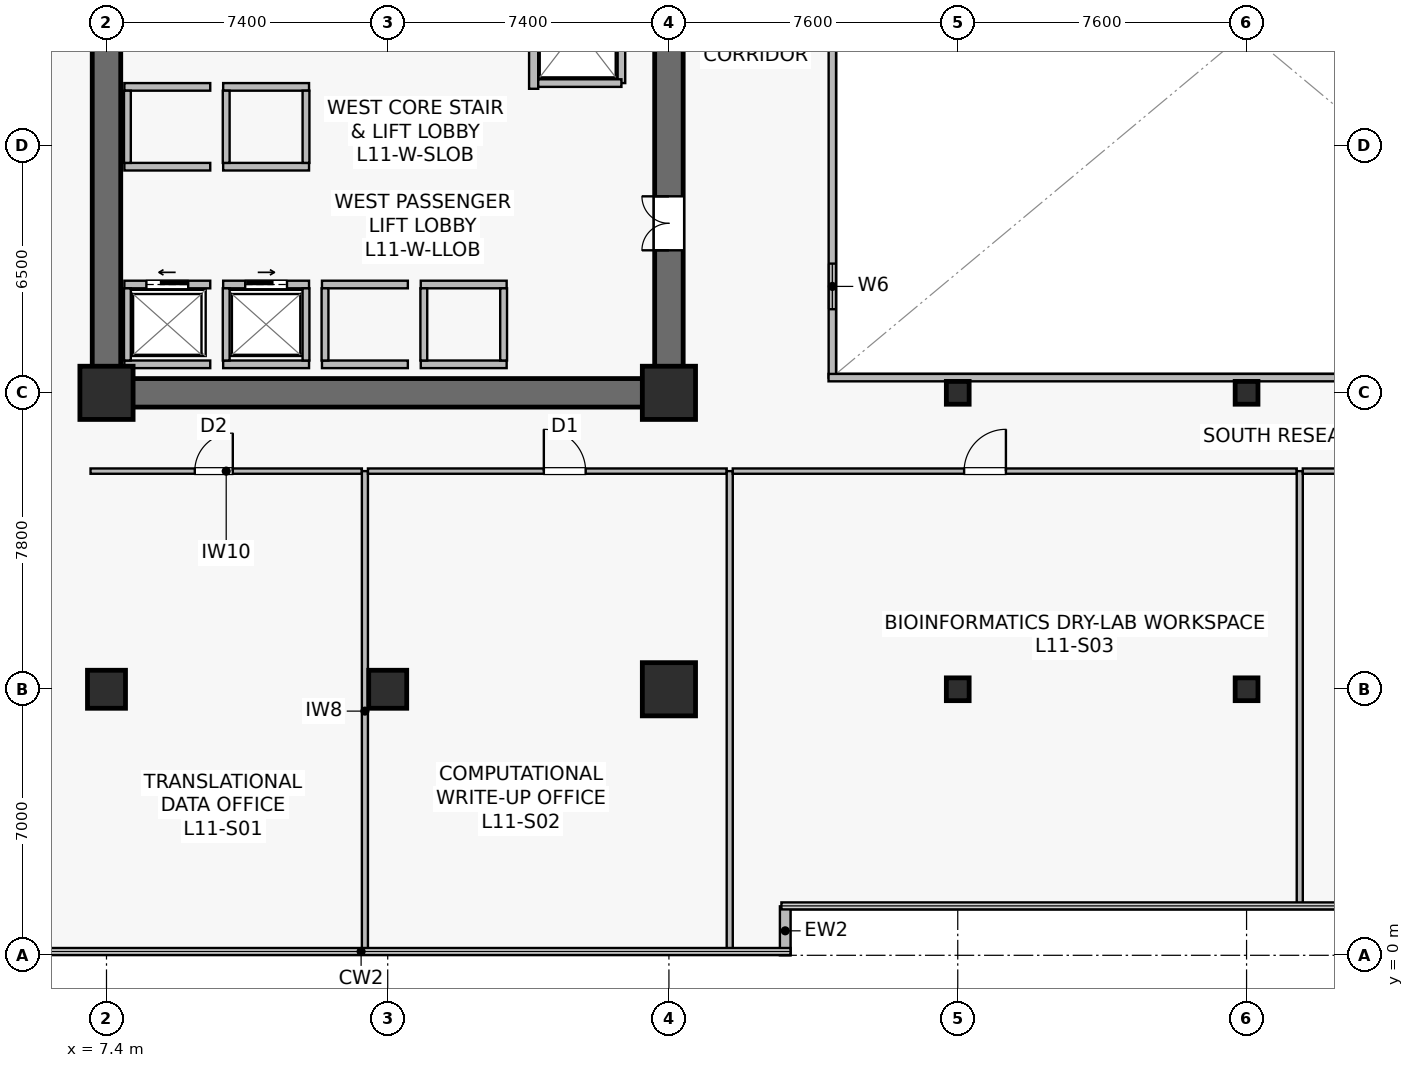
"""IFC4 building model, lengths in metres.
Left out: names, types, materials, properties, quantities, classifications, styles, units other than length and angle.
Written with IfcOpenShell. Run it as: python <this file> out.ifc"""

import sys

from ifc_helpers import new_model, si_unit, direction, frame, frame_2d, origin, origin_2d, place, context, subcontext, project, spatial, rectangle, hollow_rectangle, extrude, source, transform, mapped, element, fill, save


model = new_model("IFC4")
c1 = context("Model", 3, precision=1e-05, world=origin(), true_north=direction((0.0, 1.0)))
c2 = subcontext(c1, "Body", "Model", "MODEL_VIEW")
j1 = project(units=[si_unit("LENGTHUNIT", "METRE"), si_unit("PLANEANGLEUNIT", "RADIAN")], contexts=[c1])
p1 = place(None, origin())
s1 = spatial("IfcSite", under=j1, at=p1, CompositionType="ELEMENT")
p2 = place(p1, origin())
s2 = spatial("IfcBuilding", under=s1, at=p2, CompositionType="ELEMENT")
p3 = place(p2, frame((0.0, 0.0, 45.7)))
s3 = spatial("IfcBuildingStorey", under=s2, at=p3, CompositionType="ELEMENT", Elevation=45.7)
p4 = place(p3, frame((7.025, 14.8, 0.0), z_axis=(0.0, 0.0, 1.0), x_axis=(1.0, 0.0, 0.0)))
e1 = element("IfcWall", 1, at=p4, inside=s3, PredefinedType="SHEAR", context=c2, shape_type="SweptSolid", body=[
    extrude(rectangle(XDim=15.55, YDim=0.75, at=frame_2d((7.775, 0.0))), origin(), (0.0, 0.0, 1.0), 3.78),
])
p5 = place(p3, frame((7.4, 15.175, 0.0), z_axis=(0.0, 0.0, 1.0), x_axis=(0.0, 1.0, 0.0)))
e2 = element("IfcWall", 2, at=p5, inside=s3, PredefinedType="SHEAR", context=c2, shape_type="SweptSolid", body=[
    extrude(rectangle(XDim=18.25, YDim=0.75, at=frame_2d((9.125, 0.0))), origin(), (0.0, 0.0, 1.0), 3.78),
])
p6 = place(p3, frame((22.2, 15.175, 0.0), z_axis=(0.0, 0.0, 1.0), x_axis=(0.0, 1.0, 0.0)))
e3 = element("IfcWall", 3, at=p6, inside=s3, PredefinedType="SHEAR", context=c2, shape_type="SweptSolid", body=[
    extrude(rectangle(XDim=18.25, YDim=0.75, at=frame_2d((9.125, 0.0))), origin(), (0.0, 0.0, 1.0), 3.78),
])
p7 = place(p6, frame((3.375, 0.0, 0.0)))
e4 = element("IfcOpeningElement", 4, at=p7, cuts=e3, PredefinedType="OPENING", context=c2, shape_type="SweptSolid", body=[
    extrude(rectangle(XDim=1.42, YDim=2.2, at=frame_2d((0.71, 1.1))), frame((0.0, 0.385, 0.0), z_axis=(0.0, -1.0, 0.0), x_axis=(1.0, 0.0, 0.0)), (0.0, 0.0, 1.0), 0.77),
])
m1 = source(origin(), c2, "Body", "SweptSolid", [
    extrude(rectangle(XDim=1.0, YDim=1.0, at=origin_2d()), origin(), (0.0, 0.0, 1.0), 4.1),
])
p8 = place(p3, frame((14.8, 7.0, 0.0), z_axis=(0.0, 0.0, 1.0), x_axis=(1.0, 0.0, 0.0)))
e5 = element("IfcColumn", 5, at=p8, inside=s3, PredefinedType="COLUMN", context=c2, shape_type="MappedRepresentation", body=[
    mapped(m1, transform((0.0, 0.0, 0.0), scale=1.0)),
])
m2 = source(origin(), c2, "Body", "SweptSolid", [
    extrude(rectangle(XDim=1.4, YDim=1.4, at=origin_2d()), origin(), (0.0, 0.0, 1.0), 4.1),
])
for number, where, z_axis, x_axis in (
    (6, (22.2, 7.0, 0.0), (0.0, 0.0, 1.0), (1.0, 0.0, 0.0)),
    (7, (7.4, 14.8, 0.0), (0.0, 0.0, 1.0), (1.0, 0.0, 0.0)),
    (8, (22.2, 14.8, 0.0), (0.0, 0.0, 1.0), (1.0, 0.0, 0.0)),
):
    element("IfcColumn", number, at=place(p3, frame(where, z_axis=z_axis, x_axis=x_axis)), inside=s3, PredefinedType="COLUMN", context=c2, shape_type="MappedRepresentation", body=[
        mapped(m2, transform((0.0, 0.0, 0.0), scale=1.0)),
    ])
p9 = place(p3, frame((7.4, 7.0, 0.0), z_axis=(0.0, 0.0, 1.0), x_axis=(1.0, 0.0, 0.0)))
e9 = element("IfcColumn", 9, at=p9, inside=s3, PredefinedType="COLUMN", context=c2, shape_type="MappedRepresentation", body=[
    mapped(m1, transform((0.0, 0.0, 0.0), scale=1.0)),
])
m3 = source(origin(), c2, "Body", "SweptSolid", [
    extrude(hollow_rectangle(XDim=0.6, YDim=0.6, WallThickness=0.028, at=origin_2d()), origin(), (0.0, 0.0, 1.0), 4.1),
])
for number, where, z_axis, x_axis in (
    (10, (29.8, 7.0, 0.0), (0.0, 0.0, 1.0), (1.0, 0.0, 0.0)),
    (11, (29.8, 14.8, 0.0), (0.0, 0.0, 1.0), (1.0, 0.0, 0.0)),
    (12, (37.4, 7.0, 0.0), (0.0, 0.0, 1.0), (1.0, 0.0, 0.0)),
    (13, (37.4, 14.8, 0.0), (0.0, 0.0, 1.0), (1.0, 0.0, 0.0)),
):
    element("IfcColumn", number, at=place(p3, frame(where, z_axis=z_axis, x_axis=x_axis)), inside=s3, PredefinedType="COLUMN", context=c2, shape_type="MappedRepresentation", body=[
        mapped(m3, transform((0.0, 0.0, 0.0), scale=1.0)),
    ])
p10 = place(p3, frame((25.26, 0.0, 0.0), z_axis=(0.0, 0.0, 1.0), x_axis=(0.0, 1.0, 0.0)))
e14 = element("IfcWall", 14, at=p10, inside=s3, PredefinedType="STANDARD", context=c2, shape_type="SweptSolid", body=[
    extrude(rectangle(XDim=1.288, YDim=0.28, at=frame_2d((0.644, 0.0))), origin(), (0.0, 0.0, 1.0), 3.78),
])
p11 = place(p3, frame((18.64, 22.8, 0.0), z_axis=(0.0, 0.0, 1.0), x_axis=(0.0, 1.0, 0.0)))
e15 = element("IfcWall", 15, at=p11, inside=s3, PredefinedType="SOLIDWALL", context=c2, shape_type="SweptSolid", body=[
    extrude(rectangle(XDim=6.85, YDim=0.24, at=frame_2d((3.425, 0.0))), origin(), (0.0, 0.0, 1.0), 2.865),
])
p12 = place(p11, frame((4.85, 0.0, 0.0)))
e16 = element("IfcOpeningElement", 16, at=p12, cuts=e15, PredefinedType="OPENING", context=c2, shape_type="SweptSolid", body=[
    extrude(rectangle(XDim=1.1, YDim=2.22, at=frame_2d((0.55, 1.11))), frame((0.0, 0.13, 0.0), z_axis=(0.0, -1.0, 0.0), x_axis=(1.0, 0.0, 0.0)), (0.0, 0.0, 1.0), 0.26),
])
p13 = place(p11, frame((1.0, 0.0, 0.0)))
e17 = element("IfcOpeningElement", 17, at=p13, cuts=e15, PredefinedType="OPENING", context=c2, shape_type="SweptSolid", body=[
    extrude(rectangle(XDim=1.2, YDim=2.22, at=frame_2d((0.6, 1.11))), frame((0.0, 0.13, 0.0), z_axis=(0.0, -1.0, 0.0), x_axis=(1.0, 0.0, 0.0)), (0.0, 0.0, 1.0), 0.26),
])
p14 = place(p3, frame((7.87, 17.65, 0.0), z_axis=(0.0, 0.0, 1.0), x_axis=(1.0, 0.0, 0.0)))
e18 = element("IfcWall", 18, at=p14, inside=s3, PredefinedType="SOLIDWALL", context=c2, shape_type="SweptSolid", body=[
    extrude(rectangle(XDim=2.26, YDim=0.2, at=frame_2d((1.13, 0.0))), origin(), (0.0, 0.0, 1.0), 3.78),
])
p15 = place(p14, frame((0.58, 0.0, 0.0)))
e19 = element("IfcOpeningElement", 19, at=p15, cuts=e18, PredefinedType="OPENING", context=c2, shape_type="SweptSolid", body=[
    extrude(rectangle(XDim=1.1, YDim=2.22, at=frame_2d((0.55, 1.11))), frame((0.0, 0.11, 0.0), z_axis=(0.0, -1.0, 0.0), x_axis=(1.0, 0.0, 0.0)), (0.0, 0.0, 1.0), 0.22),
])
p16 = place(p3, frame((7.87, 15.55, 0.0), z_axis=(0.0, 0.0, 1.0), x_axis=(1.0, 0.0, 0.0)))
e20 = element("IfcWall", 20, at=p16, inside=s3, PredefinedType="SOLIDWALL", context=c2, shape_type="SweptSolid", body=[
    extrude(rectangle(XDim=2.26, YDim=0.2, at=frame_2d((1.13, 0.0))), origin(), (0.0, 0.0, 1.0), 3.78),
])
p17 = place(p3, frame((7.95, 15.65, 0.0), z_axis=(0.0, 0.0, 1.0), x_axis=(0.0, 1.0, 0.0)))
e21 = element("IfcWall", 21, at=p17, inside=s3, PredefinedType="SOLIDWALL", context=c2, shape_type="SweptSolid", body=[
    extrude(rectangle(XDim=1.9, YDim=0.18, at=frame_2d((0.95, 0.0))), origin(), (0.0, 0.0, 1.0), 3.78),
])
p18 = place(p3, frame((10.47, 17.65, 0.0), z_axis=(0.0, 0.0, 1.0), x_axis=(1.0, 0.0, 0.0)))
e22 = element("IfcWall", 22, at=p18, inside=s3, PredefinedType="SOLIDWALL", context=c2, shape_type="SweptSolid", body=[
    extrude(rectangle(XDim=2.26, YDim=0.2, at=frame_2d((1.13, 0.0))), origin(), (0.0, 0.0, 1.0), 3.78),
])
p19 = place(p18, frame((0.58, 0.0, 0.0)))
e23 = element("IfcOpeningElement", 23, at=p19, cuts=e22, PredefinedType="OPENING", context=c2, shape_type="SweptSolid", body=[
    extrude(rectangle(XDim=1.1, YDim=2.22, at=frame_2d((0.55, 1.11))), frame((0.0, 0.11, 0.0), z_axis=(0.0, -1.0, 0.0), x_axis=(1.0, 0.0, 0.0)), (0.0, 0.0, 1.0), 0.22),
])
p20 = place(p3, frame((10.47, 15.55, 0.0), z_axis=(0.0, 0.0, 1.0), x_axis=(1.0, 0.0, 0.0)))
e24 = element("IfcWall", 24, at=p20, inside=s3, PredefinedType="SOLIDWALL", context=c2, shape_type="SweptSolid", body=[
    extrude(rectangle(XDim=2.26, YDim=0.2, at=frame_2d((1.13, 0.0))), origin(), (0.0, 0.0, 1.0), 3.78),
])
for number, where, z_axis, x_axis in (
    (25, (10.55, 15.65, 0.0), (0.0, 0.0, 1.0), (0.0, 1.0, 0.0)),
    (26, (12.65, 15.65, 0.0), (0.0, 0.0, 1.0), (0.0, 1.0, 0.0)),
):
    element("IfcWall", number, at=place(p3, frame(where, z_axis=z_axis, x_axis=x_axis)), inside=s3, PredefinedType="SOLIDWALL", context=c2, shape_type="SweptSolid", body=[
        extrude(rectangle(XDim=1.9, YDim=0.18, at=frame_2d((0.95, 0.0))), origin(), (0.0, 0.0, 1.0), 3.78),
    ])
for number, where, z_axis, x_axis in (
    (27, (13.07, 17.65, 0.0), (0.0, 0.0, 1.0), (1.0, 0.0, 0.0)),
    (28, (13.07, 15.55, 0.0), (0.0, 0.0, 1.0), (1.0, 0.0, 0.0)),
):
    element("IfcWall", number, at=place(p3, frame(where, z_axis=z_axis, x_axis=x_axis)), inside=s3, PredefinedType="SOLIDWALL", context=c2, shape_type="SweptSolid", body=[
        extrude(rectangle(XDim=2.26, YDim=0.2, at=frame_2d((1.13, 0.0))), origin(), (0.0, 0.0, 1.0), 3.065),
    ])
p21 = place(p3, frame((13.15, 15.65, 0.0), z_axis=(0.0, 0.0, 1.0), x_axis=(0.0, 1.0, 0.0)))
e29 = element("IfcWall", 29, at=p21, inside=s3, PredefinedType="SOLIDWALL", context=c2, shape_type="SweptSolid", body=[
    extrude(rectangle(XDim=1.9, YDim=0.18, at=frame_2d((0.95, 0.0))), origin(), (0.0, 0.0, 1.0), 3.78),
])
for number, where, z_axis, x_axis in (
    (30, (15.67, 17.65, 0.0), (0.0, 0.0, 1.0), (1.0, 0.0, 0.0)),
    (31, (15.67, 15.55, 0.0), (0.0, 0.0, 1.0), (1.0, 0.0, 0.0)),
):
    element("IfcWall", number, at=place(p3, frame(where, z_axis=z_axis, x_axis=x_axis)), inside=s3, PredefinedType="SOLIDWALL", context=c2, shape_type="SweptSolid", body=[
        extrude(rectangle(XDim=2.26, YDim=0.2, at=frame_2d((1.13, 0.0))), origin(), (0.0, 0.0, 1.0), 3.78),
    ])
for number, where, z_axis, x_axis in (
    (32, (15.75, 15.65, 0.0), (0.0, 0.0, 1.0), (0.0, 1.0, 0.0)),
    (33, (17.85, 15.65, 0.0), (0.0, 0.0, 1.0), (0.0, 1.0, 0.0)),
):
    element("IfcWall", number, at=place(p3, frame(where, z_axis=z_axis, x_axis=x_axis)), inside=s3, PredefinedType="SOLIDWALL", context=c2, shape_type="SweptSolid", body=[
        extrude(rectangle(XDim=1.9, YDim=0.18, at=frame_2d((0.95, 0.0))), origin(), (0.0, 0.0, 1.0), 3.78),
    ])
for number, where, z_axis, x_axis in (
    (34, (7.87, 20.75, 0.0), (0.0, 0.0, 1.0), (1.0, 0.0, 0.0)),
    (35, (7.87, 22.85, 0.0), (0.0, 0.0, 1.0), (1.0, 0.0, 0.0)),
):
    element("IfcWall", number, at=place(p3, frame(where, z_axis=z_axis, x_axis=x_axis)), inside=s3, PredefinedType="SOLIDWALL", context=c2, shape_type="SweptSolid", body=[
        extrude(rectangle(XDim=2.26, YDim=0.2, at=frame_2d((1.13, 0.0))), origin(), (0.0, 0.0, 1.0), 3.78),
    ])
p22 = place(p3, frame((7.95, 20.85, 0.0), z_axis=(0.0, 0.0, 1.0), x_axis=(0.0, 1.0, 0.0)))
e36 = element("IfcWall", 36, at=p22, inside=s3, PredefinedType="SOLIDWALL", context=c2, shape_type="SweptSolid", body=[
    extrude(rectangle(XDim=1.9, YDim=0.18, at=frame_2d((0.95, 0.0))), origin(), (0.0, 0.0, 1.0), 3.78),
])
for number, where, z_axis, x_axis in (
    (37, (10.47, 20.75, 0.0), (0.0, 0.0, 1.0), (1.0, 0.0, 0.0)),
    (38, (10.47, 22.85, 0.0), (0.0, 0.0, 1.0), (1.0, 0.0, 0.0)),
):
    element("IfcWall", number, at=place(p3, frame(where, z_axis=z_axis, x_axis=x_axis)), inside=s3, PredefinedType="SOLIDWALL", context=c2, shape_type="SweptSolid", body=[
        extrude(rectangle(XDim=2.26, YDim=0.2, at=frame_2d((1.13, 0.0))), origin(), (0.0, 0.0, 1.0), 3.78),
    ])
for number, where, z_axis, x_axis in (
    (39, (10.55, 20.85, 0.0), (0.0, 0.0, 1.0), (0.0, 1.0, 0.0)),
    (40, (12.65, 20.85, 0.0), (0.0, 0.0, 1.0), (0.0, 1.0, 0.0)),
):
    element("IfcWall", number, at=place(p3, frame(where, z_axis=z_axis, x_axis=x_axis)), inside=s3, PredefinedType="SOLIDWALL", context=c2, shape_type="SweptSolid", body=[
        extrude(rectangle(XDim=1.9, YDim=0.18, at=frame_2d((0.95, 0.0))), origin(), (0.0, 0.0, 1.0), 3.78),
    ])
p23 = place(p3, frame((20.95, 22.95, 0.0), z_axis=(0.0, 0.0, 1.0), x_axis=(0.0, 1.0, 0.0)))
e41 = element("IfcWall", 41, at=p23, inside=s3, PredefinedType="SOLIDWALL", context=c2, shape_type="SweptSolid", body=[
    extrude(rectangle(XDim=2.9, YDim=0.2, at=frame_2d((1.45, 0.0))), origin(), (0.0, 0.0, 1.0), 2.865),
])
p24 = place(p3, frame((18.76, 22.95, 0.0), z_axis=(0.0, 0.0, 1.0), x_axis=(1.0, 0.0, 0.0)))
e42 = element("IfcWall", 42, at=p24, inside=s3, PredefinedType="SOLIDWALL", context=c2, shape_type="SweptSolid", body=[
    extrude(rectangle(XDim=2.19, YDim=0.2, at=frame_2d((1.095, 0.0))), origin(), (0.0, 0.0, 1.0), 3.78),
])
p25 = place(p3, frame((26.5, 15.2, 0.0), z_axis=(0.0, 0.0, 1.0), x_axis=(0.0, 1.0, 0.0)))
e43 = element("IfcWall", 43, at=p25, inside=s3, PredefinedType="SOLIDWALL", context=c2, shape_type="SweptSolid", body=[
    extrude(rectangle(XDim=18.2, YDim=0.195, at=frame_2d((9.1, 0.0))), origin(), (0.0, 0.0, 1.0), 3.78),
])
p26 = place(p25, frame((1.8, 0.0, 0.9)))
e44 = element("IfcOpeningElement", 44, at=p26, cuts=e43, PredefinedType="OPENING", context=c2, shape_type="SweptSolid", body=[
    extrude(rectangle(XDim=1.2, YDim=1.35, at=frame_2d((0.6, 0.675))), frame((0.0, 0.107, 0.0), z_axis=(0.0, -1.0, 0.0), x_axis=(1.0, 0.0, 0.0)), (0.0, 0.0, 1.0), 0.215),
])
p27 = place(p25, frame((13.2, 0.0, 0.9)))
e45 = element("IfcOpeningElement", 45, at=p27, cuts=e43, PredefinedType="OPENING", context=c2, shape_type="SweptSolid", body=[
    extrude(rectangle(XDim=1.2, YDim=1.35, at=frame_2d((0.6, 0.675))), frame((0.0, 0.107, 0.0), z_axis=(0.0, -1.0, 0.0), x_axis=(1.0, 0.0, 0.0)), (0.0, 0.0, 1.0), 0.215),
])
p28 = place(p3, frame((26.4, 15.2, 0.0), z_axis=(0.0, 0.0, 1.0), x_axis=(1.0, 0.0, 0.0)))
e46 = element("IfcWall", 46, at=p28, inside=s3, PredefinedType="SOLIDWALL", context=c2, shape_type="SweptSolid", body=[
    extrude(rectangle(XDim=22.0, YDim=0.195, at=frame_2d((11.0, 0.0))), origin(), (0.0, 0.0, 1.0), 3.78),
])
p29 = place(p3, frame((6.98, 12.74, 0.0), z_axis=(0.0, 0.0, 1.0), x_axis=(1.0, 0.0, 0.0)))
e47 = element("IfcWall", 47, at=p29, inside=s3, PredefinedType="PARTITIONING", context=c2, shape_type="SweptSolid", body=[
    extrude(rectangle(XDim=7.14, YDim=0.14, at=frame_2d((3.57, 0.0))), origin(), (0.0, 0.0, 1.0), 3.265),
])
p30 = place(p29, frame((2.744, 0.0, 0.0)))
e48 = element("IfcOpeningElement", 48, at=p30, cuts=e47, PredefinedType="OPENING", context=c2, shape_type="SweptSolid", body=[
    extrude(rectangle(XDim=1.0, YDim=2.15, at=frame_2d((0.5, 1.075))), frame((0.0, 0.08, 0.0), z_axis=(0.0, -1.0, 0.0), x_axis=(1.0, 0.0, 0.0)), (0.0, 0.0, 1.0), 0.16),
])
p31 = place(p3, frame((14.2, 0.11, 0.0), z_axis=(0.0, 0.0, 1.0), x_axis=(0.0, 1.0, 0.0)))
e49 = element("IfcWall", 49, at=p31, inside=s3, PredefinedType="PARTITIONING", context=c2, shape_type="SweptSolid", body=[
    extrude(rectangle(XDim=12.63, YDim=0.16, at=frame_2d((6.315, 0.0))), origin(), (0.0, 0.0, 1.0), 3.015),
])
p32 = place(p3, frame((14.28, 12.74, 0.0), z_axis=(0.0, 0.0, 1.0), x_axis=(1.0, 0.0, 0.0)))
e50 = element("IfcWall", 50, at=p32, inside=s3, PredefinedType="PARTITIONING", context=c2, shape_type="SweptSolid", body=[
    extrude(rectangle(XDim=9.44, YDim=0.14, at=frame_2d((4.72, 0.0))), origin(), (0.0, 0.0, 1.0), 3.065),
])
p33 = place(p32, frame((4.628, 0.0, 0.0)))
e51 = element("IfcOpeningElement", 51, at=p33, cuts=e50, PredefinedType="OPENING", context=c2, shape_type="SweptSolid", body=[
    extrude(rectangle(XDim=1.1, YDim=2.18, at=frame_2d((0.55, 1.09))), frame((0.0, 0.08, 0.0), z_axis=(0.0, -1.0, 0.0), x_axis=(1.0, 0.0, 0.0)), (0.0, 0.0, 1.0), 0.16),
])
p34 = place(p3, frame((23.8, 0.11, 0.0), z_axis=(0.0, 0.0, 1.0), x_axis=(0.0, 1.0, 0.0)))
e52 = element("IfcWall", 52, at=p34, inside=s3, PredefinedType="PARTITIONING", context=c2, shape_type="SweptSolid", body=[
    extrude(rectangle(XDim=12.63, YDim=0.16, at=frame_2d((6.315, 0.0))), origin(), (0.0, 0.0, 1.0), 3.015),
])
p35 = place(p3, frame((23.88, 12.74, 0.0), z_axis=(0.0, 0.0, 1.0), x_axis=(1.0, 0.0, 0.0)))
e53 = element("IfcWall", 53, at=p35, inside=s3, PredefinedType="PARTITIONING", context=c2, shape_type="SweptSolid", body=[
    extrude(rectangle(XDim=14.84, YDim=0.14, at=frame_2d((7.42, 0.0))), origin(), (0.0, 0.0, 1.0), 3.065),
])
p36 = place(p35, frame((6.088, 0.0, 0.0)))
e54 = element("IfcOpeningElement", 54, at=p36, cuts=e53, PredefinedType="OPENING", context=c2, shape_type="SweptSolid", body=[
    extrude(rectangle(XDim=1.1, YDim=2.18, at=frame_2d((0.55, 1.09))), frame((0.0, 0.08, 0.0), z_axis=(0.0, -1.0, 0.0), x_axis=(1.0, 0.0, 0.0)), (0.0, 0.0, 1.0), 0.16),
])
p37 = place(p3, frame((38.8, 1.31, 0.0), z_axis=(0.0, 0.0, 1.0), x_axis=(0.0, 1.0, 0.0)))
e55 = element("IfcWall", 55, at=p37, inside=s3, PredefinedType="PARTITIONING", context=c2, shape_type="SweptSolid", body=[
    extrude(rectangle(XDim=11.43, YDim=0.16, at=frame_2d((5.715, 0.0))), origin(), (0.0, 0.0, 1.0), 3.015),
])
p38 = place(p3, frame((38.88, 12.74, 0.0), z_axis=(0.0, 0.0, 1.0), x_axis=(1.0, 0.0, 0.0)))
e56 = element("IfcWall", 56, at=p38, inside=s3, PredefinedType="PARTITIONING", context=c2, shape_type="SweptSolid", body=[
    extrude(rectangle(XDim=16.44, YDim=0.14, at=frame_2d((8.22, 0.0))), origin(), (0.0, 0.0, 1.0), 3.065),
])
p39 = place(p38, frame((8.548, 0.0, 0.0)))
e57 = element("IfcOpeningElement", 57, at=p39, cuts=e56, PredefinedType="OPENING", context=c2, shape_type="SweptSolid", body=[
    extrude(rectangle(XDim=1.1, YDim=2.18, at=frame_2d((0.55, 1.09))), frame((0.0, 0.08, 0.0), z_axis=(0.0, -1.0, 0.0), x_axis=(1.0, 0.0, 0.0)), (0.0, 0.0, 1.0), 0.16),
])
m4 = source(origin(), c2, "Body", "SweptSolid", [
    extrude(rectangle(XDim=1.2, YDim=1.35, at=frame_2d((0.6, 0.675))), frame((0.0, 0.03, 0.0), z_axis=(0.0, -1.0, 0.0), x_axis=(1.0, 0.0, 0.0)), (0.0, 0.0, 1.0), 0.06),
])
p40 = place(p26, origin())
e58 = element("IfcWindow", 58, at=p40, inside=s3, PartitioningType="SINGLE_PANEL", PredefinedType="WINDOW", context=c2, shape_type="MappedRepresentation", body=[
    mapped(m4, transform((0.0, 0.0, 0.0), scale=1.0)),
])
fill(e44, e58)
m5 = source(origin(), c2, "Body", "SweptSolid", [
    extrude(rectangle(XDim=1.1, YDim=2.22, at=frame_2d((0.55, 1.11))), frame((0.0, 0.025, 0.0), z_axis=(0.0, -1.0, 0.0), x_axis=(1.0, 0.0, 0.0)), (0.0, 0.0, 1.0), 0.05),
])
p41 = place(p15, origin())
e59 = element("IfcDoor", 59, at=p41, inside=s3, OperationType="SLIDING_TO_LEFT", PredefinedType="USERDEFINED", context=c2, shape_type="MappedRepresentation", body=[
    mapped(m5, transform((0.0, 0.0, 0.0), scale=1.0)),
])
fill(e19, e59)
p42 = place(p19, origin())
e60 = element("IfcDoor", 60, at=p42, inside=s3, OperationType="SLIDING_TO_RIGHT", PredefinedType="USERDEFINED", context=c2, shape_type="MappedRepresentation", body=[
    mapped(m5, transform((0.0, 0.0, 0.0), scale=1.0)),
])
fill(e23, e60)
m6 = source(origin(), c2, "Body", "SweptSolid", [
    extrude(rectangle(XDim=1.42, YDim=2.2, at=frame_2d((0.71, 1.1))), frame((0.0, 0.025, 0.0), z_axis=(0.0, -1.0, 0.0), x_axis=(1.0, 0.0, 0.0)), (0.0, 0.0, 1.0), 0.05),
])
p43 = place(p7, origin())
e61 = element("IfcDoor", 61, at=p43, inside=s3, OperationType="DOUBLE_DOOR_SINGLE_SWING", PredefinedType="DOOR", context=c2, shape_type="MappedRepresentation", body=[
    mapped(m6, transform((0.0, 0.0, 0.0), scale=1.0)),
])
fill(e4, e61)
m7 = source(origin(), c2, "Body", "SweptSolid", [
    extrude(rectangle(XDim=1.0, YDim=2.15, at=frame_2d((0.5, 1.075))), frame((0.0, 0.025, 0.0), z_axis=(0.0, -1.0, 0.0), x_axis=(1.0, 0.0, 0.0)), (0.0, 0.0, 1.0), 0.05),
])
p44 = place(p30, origin())
e62 = element("IfcDoor", 62, at=p44, inside=s3, OperationType="SINGLE_SWING_RIGHT", PredefinedType="DOOR", context=c2, shape_type="MappedRepresentation", body=[
    mapped(m7, transform((0.0, 0.0, 0.0), scale=1.0)),
])
fill(e48, e62)
m8 = source(origin(), c2, "Body", "SweptSolid", [
    extrude(rectangle(XDim=1.1, YDim=2.18, at=frame_2d((0.55, 1.09))), frame((0.0, 0.025, 0.0), z_axis=(0.0, -1.0, 0.0), x_axis=(1.0, 0.0, 0.0)), (0.0, 0.0, 1.0), 0.05),
])
p45 = place(p33, origin())
e63 = element("IfcDoor", 63, at=p45, inside=s3, OperationType="SINGLE_SWING_LEFT", PredefinedType="DOOR", context=c2, shape_type="MappedRepresentation", body=[
    mapped(m8, transform((0.0, 0.0, 0.0), scale=1.0)),
])
fill(e51, e63)
p46 = place(p36, origin())
e64 = element("IfcDoor", 64, at=p46, inside=s3, OperationType="SINGLE_SWING_RIGHT", PredefinedType="DOOR", context=c2, shape_type="MappedRepresentation", body=[
    mapped(m8, transform((0.0, 0.0, 0.0), scale=1.0)),
])
fill(e54, e64)
save(model, sys.argv[1])
